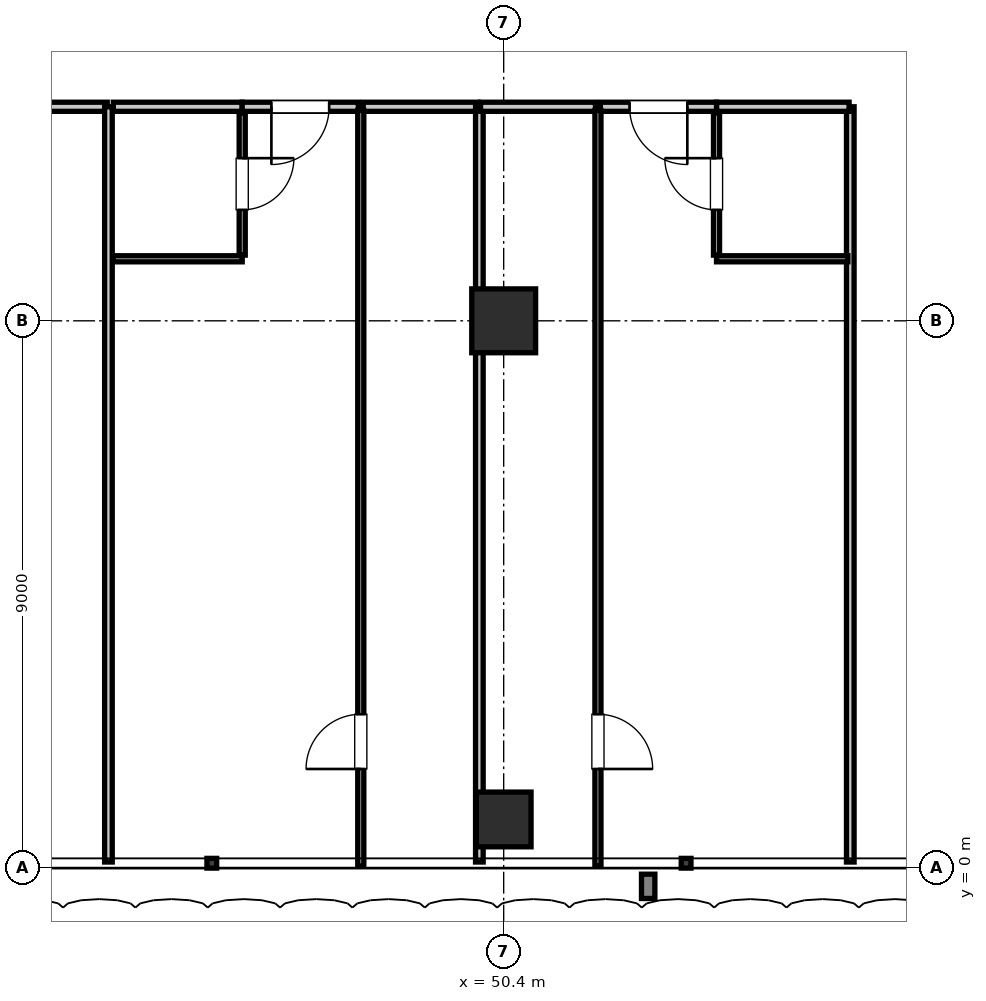
"""IFC4 building model, lengths in metres.
Left out: names, types, materials, properties, quantities, classifications, styles, units other than length and angle.
Written with IfcOpenShell. Run it as: python <this file> out.ifc"""

import sys

from ifc_helpers import new_model, si_unit, direction, frame, frame_2d, origin, origin_2d, place, context, subcontext, project, spatial, rectangle, extrude, element, fill, save


model = new_model("IFC4")
c1 = context("Model", 3, precision=1e-05, world=origin(), true_north=direction((0.0, 1.0)))
c2 = subcontext(c1, "Body", "Model", "MODEL_VIEW")
j1 = project(units=[si_unit("LENGTHUNIT", "METRE"), si_unit("PLANEANGLEUNIT", "RADIAN")], contexts=[c1])
p1 = place(None, origin())
s1 = spatial("IfcSite", under=j1, at=p1, CompositionType="ELEMENT")
p2 = place(p1, origin())
s2 = spatial("IfcBuilding", under=s1, at=p2, CompositionType="ELEMENT")
p3 = place(p2, frame((0.0, 0.0, 34.65)))
s3 = spatial("IfcBuildingStorey", under=s2, at=p3, CompositionType="ELEMENT", Elevation=34.65)
p4 = place(p3, frame((50.4, 9.0, 0.0), z_axis=(0.0, 0.0, 1.0), x_axis=(1.0, 0.0, 0.0)))
e1 = element("IfcColumn", 1, at=p4, inside=s3, PredefinedType="COLUMN", context=c2, shape_type="SweptSolid", body=[
    extrude(rectangle(XDim=1.05, YDim=1.05, at=origin_2d()), origin(), (0.0, 0.0, 1.0), 3.85),
])
p5 = place(p3, frame((50.4, 0.8, 0.0), z_axis=(0.0, 0.0, 1.0), x_axis=(1.0, 0.0, 0.0)))
e2 = element("IfcColumn", 2, at=p5, inside=s3, PredefinedType="COLUMN", context=c2, shape_type="SweptSolid", body=[
    extrude(rectangle(XDim=0.9, YDim=0.9, at=origin_2d()), origin(), (0.0, 0.0, 1.0), 3.85),
])
p6 = place(p3, frame((56.1, 0.1, 0.0), z_axis=(0.0, 0.0, 1.0), x_axis=(0.0, 1.0, 0.0)))
e3 = element("IfcWall", 3, at=p6, inside=s3, PredefinedType="PARTITIONING", context=c2, shape_type="SweptSolid", body=[
    extrude(rectangle(XDim=12.42, YDim=0.125, at=frame_2d((6.21, 0.0))), origin(), (0.0, 0.0, 1.0), 3.61),
])
p7 = place(p3, frame((41.99, 12.52, 0.0), z_axis=(0.0, 0.0, 1.0), x_axis=(1.0, 0.0, 0.0)))
e4 = element("IfcWall", 4, at=p7, inside=s3, PredefinedType="PARTITIONING", context=c2, shape_type="SweptSolid", body=[
    extrude(rectangle(XDim=1.89, YDim=0.15, at=frame_2d((0.945, 0.0))), origin(), (0.0, 0.0, 1.0), 3.61),
])
p8 = place(p3, frame((43.9, 0.1, 0.0), z_axis=(0.0, 0.0, 1.0), x_axis=(0.0, 1.0, 0.0)))
e5 = element("IfcWall", 5, at=p8, inside=s3, PredefinedType="PARTITIONING", context=c2, shape_type="SweptSolid", body=[
    extrude(rectangle(XDim=12.42, YDim=0.125, at=frame_2d((6.21, 0.0))), origin(), (0.0, 0.0, 1.0), 3.61),
])
p9 = place(p3, frame((43.98, 12.52, 0.0), z_axis=(0.0, 0.0, 1.0), x_axis=(1.0, 0.0, 0.0)))
e6 = element("IfcWall", 6, at=p9, inside=s3, PredefinedType="PARTITIONING", context=c2, shape_type="SweptSolid", body=[
    extrude(rectangle(XDim=2.12, YDim=0.15, at=frame_2d((1.06, 0.0))), origin(), (0.0, 0.0, 1.0), 3.61),
])
p10 = place(p3, frame((43.98, 10.02, 0.0), z_axis=(0.0, 0.0, 1.0), x_axis=(1.0, 0.0, 0.0)))
e7 = element("IfcWall", 7, at=p10, inside=s3, PredefinedType="PARTITIONING", context=c2, shape_type="SweptSolid", body=[
    extrude(rectangle(XDim=2.12, YDim=0.1, at=frame_2d((1.06, 0.0))), origin(), (0.0, 0.0, 1.0), 3.61),
])
p11 = place(p3, frame((46.1, 10.08, 0.0), z_axis=(0.0, 0.0, 1.0), x_axis=(0.0, 1.0, 0.0)))
e8 = element("IfcWall", 8, at=p11, inside=s3, PredefinedType="PARTITIONING", context=c2, shape_type="SweptSolid", body=[
    extrude(rectangle(XDim=2.34, YDim=0.1, at=frame_2d((1.17, 0.0))), origin(), (0.0, 0.0, 1.0), 3.304),
])
p12 = place(p11, frame((0.745, 0.0, 0.0)))
e9 = element("IfcOpeningElement", 9, at=p12, cuts=e8, PredefinedType="OPENING", context=c2, shape_type="SweptSolid", body=[
    extrude(rectangle(XDim=0.85, YDim=2.1, at=frame_2d((0.425, 1.05))), frame((0.0, 0.06, 0.0), z_axis=(0.0, -1.0, 0.0), x_axis=(1.0, 0.0, 0.0)), (0.0, 0.0, 1.0), 0.12),
])
p13 = place(p3, frame((46.1, 12.52, 0.0), z_axis=(0.0, 0.0, 1.0), x_axis=(1.0, 0.0, 0.0)))
e10 = element("IfcWall", 10, at=p13, inside=s3, PredefinedType="PARTITIONING", context=c2, shape_type="SweptSolid", body=[
    extrude(rectangle(XDim=1.91, YDim=0.15, at=frame_2d((0.955, 0.0))), origin(), (0.0, 0.0, 1.0), 3.61),
])
p14 = place(p13, frame((0.48, 0.0, 0.0)))
e11 = element("IfcOpeningElement", 11, at=p14, cuts=e10, PredefinedType="OPENING", context=c2, shape_type="SweptSolid", body=[
    extrude(rectangle(XDim=0.95, YDim=2.15, at=frame_2d((0.475, 1.075))), frame((0.0, 0.085, 0.0), z_axis=(0.0, -1.0, 0.0), x_axis=(1.0, 0.0, 0.0)), (0.0, 0.0, 1.0), 0.17),
])
p15 = place(p3, frame((48.09, 12.52, 0.0), z_axis=(0.0, 0.0, 1.0), x_axis=(1.0, 0.0, 0.0)))
e12 = element("IfcWall", 12, at=p15, inside=s3, PredefinedType="PARTITIONING", context=c2, shape_type="SweptSolid", body=[
    extrude(rectangle(XDim=1.89, YDim=0.15, at=frame_2d((0.945, 0.0))), origin(), (0.0, 0.0, 1.0), 3.61),
])
p16 = place(p3, frame((48.05, 0.03, 0.0), z_axis=(0.0, 0.0, 1.0), x_axis=(0.0, 1.0, 0.0)))
e13 = element("IfcWall", 13, at=p16, inside=s3, PredefinedType="PARTITIONING", context=c2, shape_type="SweptSolid", body=[
    extrude(rectangle(XDim=12.43, YDim=0.1, at=frame_2d((6.215, 0.0))), origin(), (0.0, 0.0, 1.0), 3.61),
])
p17 = place(p16, frame((1.6, 0.0, 0.0)))
e14 = element("IfcOpeningElement", 14, at=p17, cuts=e13, PredefinedType="OPENING", context=c2, shape_type="SweptSolid", body=[
    extrude(rectangle(XDim=0.9, YDim=2.1, at=frame_2d((0.45, 1.05))), frame((0.0, 0.06, 0.0), z_axis=(0.0, -1.0, 0.0), x_axis=(1.0, 0.0, 0.0)), (0.0, 0.0, 1.0), 0.12),
])
p18 = place(p3, frame((50.0, 0.1, 0.0), z_axis=(0.0, 0.0, 1.0), x_axis=(0.0, 1.0, 0.0)))
e15 = element("IfcWall", 15, at=p18, inside=s3, PredefinedType="PARTITIONING", context=c2, shape_type="SweptSolid", body=[
    extrude(rectangle(XDim=12.42, YDim=0.125, at=frame_2d((6.21, 0.0))), origin(), (0.0, 0.0, 1.0), 3.61),
])
p19 = place(p3, frame((53.9, 12.52, 0.0), z_axis=(0.0, 0.0, 1.0), x_axis=(1.0, 0.0, 0.0)))
e16 = element("IfcWall", 16, at=p19, inside=s3, PredefinedType="PARTITIONING", context=c2, shape_type="SweptSolid", body=[
    extrude(rectangle(XDim=2.18, YDim=0.15, at=frame_2d((1.09, 0.0))), origin(), (0.0, 0.0, 1.0), 3.61),
])
p20 = place(p3, frame((53.9, 10.02, 0.0), z_axis=(0.0, 0.0, 1.0), x_axis=(1.0, 0.0, 0.0)))
e17 = element("IfcWall", 17, at=p20, inside=s3, PredefinedType="PARTITIONING", context=c2, shape_type="SweptSolid", body=[
    extrude(rectangle(XDim=2.16, YDim=0.1, at=frame_2d((1.08, 0.0))), origin(), (0.0, 0.0, 1.0), 3.61),
])
p21 = place(p3, frame((53.9, 10.08, 0.0), z_axis=(0.0, 0.0, 1.0), x_axis=(0.0, 1.0, 0.0)))
e18 = element("IfcWall", 18, at=p21, inside=s3, PredefinedType="PARTITIONING", context=c2, shape_type="SweptSolid", body=[
    extrude(rectangle(XDim=2.34, YDim=0.1, at=frame_2d((1.17, 0.0))), origin(), (0.0, 0.0, 1.0), 3.61),
])
p22 = place(p21, frame((0.745, 0.0, 0.0)))
e19 = element("IfcOpeningElement", 19, at=p22, cuts=e18, PredefinedType="OPENING", context=c2, shape_type="SweptSolid", body=[
    extrude(rectangle(XDim=0.85, YDim=2.1, at=frame_2d((0.425, 1.05))), frame((0.0, 0.06, 0.0), z_axis=(0.0, -1.0, 0.0), x_axis=(1.0, 0.0, 0.0)), (0.0, 0.0, 1.0), 0.12),
])
p23 = place(p3, frame((50.02, 12.52, 0.0), z_axis=(0.0, 0.0, 1.0), x_axis=(1.0, 0.0, 0.0)))
e20 = element("IfcWall", 20, at=p23, inside=s3, PredefinedType="PARTITIONING", context=c2, shape_type="SweptSolid", body=[
    extrude(rectangle(XDim=1.89, YDim=0.15, at=frame_2d((0.945, 0.0))), origin(), (0.0, 0.0, 1.0), 3.61),
])
p24 = place(p3, frame((51.99, 12.52, 0.0), z_axis=(0.0, 0.0, 1.0), x_axis=(1.0, 0.0, 0.0)))
e21 = element("IfcWall", 21, at=p24, inside=s3, PredefinedType="PARTITIONING", context=c2, shape_type="SweptSolid", body=[
    extrude(rectangle(XDim=1.91, YDim=0.15, at=frame_2d((0.955, 0.0))), origin(), (0.0, 0.0, 1.0), 3.61),
])
p25 = place(p24, frame((0.48, 0.0, 0.0)))
e22 = element("IfcOpeningElement", 22, at=p25, cuts=e21, PredefinedType="OPENING", context=c2, shape_type="SweptSolid", body=[
    extrude(rectangle(XDim=0.95, YDim=2.15, at=frame_2d((0.475, 1.075))), frame((0.0, 0.085, 0.0), z_axis=(0.0, -1.0, 0.0), x_axis=(1.0, 0.0, 0.0)), (0.0, 0.0, 1.0), 0.17),
])
p26 = place(p3, frame((51.95, 0.03, 0.0), z_axis=(0.0, 0.0, 1.0), x_axis=(0.0, 1.0, 0.0)))
e23 = element("IfcWall", 23, at=p26, inside=s3, PredefinedType="PARTITIONING", context=c2, shape_type="SweptSolid", body=[
    extrude(rectangle(XDim=12.43, YDim=0.1, at=frame_2d((6.215, 0.0))), origin(), (0.0, 0.0, 1.0), 3.61),
])
p27 = place(p26, frame((1.6, 0.0, 0.0)))
e24 = element("IfcOpeningElement", 24, at=p27, cuts=e23, PredefinedType="OPENING", context=c2, shape_type="SweptSolid", body=[
    extrude(rectangle(XDim=0.9, YDim=2.1, at=frame_2d((0.45, 1.05))), frame((0.0, 0.06, 0.0), z_axis=(0.0, -1.0, 0.0), x_axis=(1.0, 0.0, 0.0)), (0.0, 0.0, 1.0), 0.12),
])
p28 = place(p12, frame((0.85, 0.0, 0.0), z_axis=(0.0, 0.0, 1.0), x_axis=(-1.0, 0.0, 0.0)))
e25 = element("IfcDoor", 25, at=p28, inside=s3, OperationType="SINGLE_SWING_LEFT", PredefinedType="DOOR", context=c2, shape_type="SweptSolid", body=[
    extrude(rectangle(XDim=0.85, YDim=2.1, at=frame_2d((0.425, 1.05))), frame((0.0, 0.025, 0.0), z_axis=(0.0, -1.0, 0.0), x_axis=(1.0, 0.0, 0.0)), (0.0, 0.0, 1.0), 0.05),
])
fill(e9, e25)
p29 = place(p14, frame((0.95, 0.0, 0.0), z_axis=(0.0, 0.0, 1.0), x_axis=(-1.0, 0.0, 0.0)))
e26 = element("IfcDoor", 26, at=p29, inside=s3, OperationType="SINGLE_SWING_RIGHT", PredefinedType="DOOR", context=c2, shape_type="SweptSolid", body=[
    extrude(rectangle(XDim=0.95, YDim=2.15, at=frame_2d((0.475, 1.075))), frame((0.0, 0.025, 0.0), z_axis=(0.0, -1.0, 0.0), x_axis=(1.0, 0.0, 0.0)), (0.0, 0.0, 1.0), 0.05),
])
fill(e11, e26)
p30 = place(p17, origin())
e27 = element("IfcDoor", 27, at=p30, inside=s3, OperationType="SINGLE_SWING_LEFT", PredefinedType="DOOR", context=c2, shape_type="SweptSolid", body=[
    extrude(rectangle(XDim=0.9, YDim=2.1, at=frame_2d((0.45, 1.05))), frame((0.0, 0.025, 0.0), z_axis=(0.0, -1.0, 0.0), x_axis=(1.0, 0.0, 0.0)), (0.0, 0.0, 1.0), 0.05),
])
fill(e14, e27)
p31 = place(p22, origin())
e28 = element("IfcDoor", 28, at=p31, inside=s3, OperationType="SINGLE_SWING_RIGHT", PredefinedType="DOOR", context=c2, shape_type="SweptSolid", body=[
    extrude(rectangle(XDim=0.85, YDim=2.1, at=frame_2d((0.425, 1.05))), frame((0.0, 0.025, 0.0), z_axis=(0.0, -1.0, 0.0), x_axis=(1.0, 0.0, 0.0)), (0.0, 0.0, 1.0), 0.05),
])
fill(e19, e28)
p32 = place(p25, frame((0.95, 0.0, 0.0), z_axis=(0.0, 0.0, 1.0), x_axis=(-1.0, 0.0, 0.0)))
e29 = element("IfcDoor", 29, at=p32, inside=s3, OperationType="SINGLE_SWING_LEFT", PredefinedType="DOOR", context=c2, shape_type="SweptSolid", body=[
    extrude(rectangle(XDim=0.95, YDim=2.15, at=frame_2d((0.475, 1.075))), frame((0.0, 0.025, 0.0), z_axis=(0.0, -1.0, 0.0), x_axis=(1.0, 0.0, 0.0)), (0.0, 0.0, 1.0), 0.05),
])
fill(e22, e29)
p33 = place(p27, frame((0.9, 0.0, 0.0), z_axis=(0.0, 0.0, 1.0), x_axis=(-1.0, 0.0, 0.0)))
e30 = element("IfcDoor", 30, at=p33, inside=s3, OperationType="SINGLE_SWING_RIGHT", PredefinedType="DOOR", context=c2, shape_type="SweptSolid", body=[
    extrude(rectangle(XDim=0.9, YDim=2.1, at=frame_2d((0.45, 1.05))), frame((0.0, 0.025, 0.0), z_axis=(0.0, -1.0, 0.0), x_axis=(1.0, 0.0, 0.0)), (0.0, 0.0, 1.0), 0.05),
])
fill(e24, e30)
save(model, sys.argv[1])
